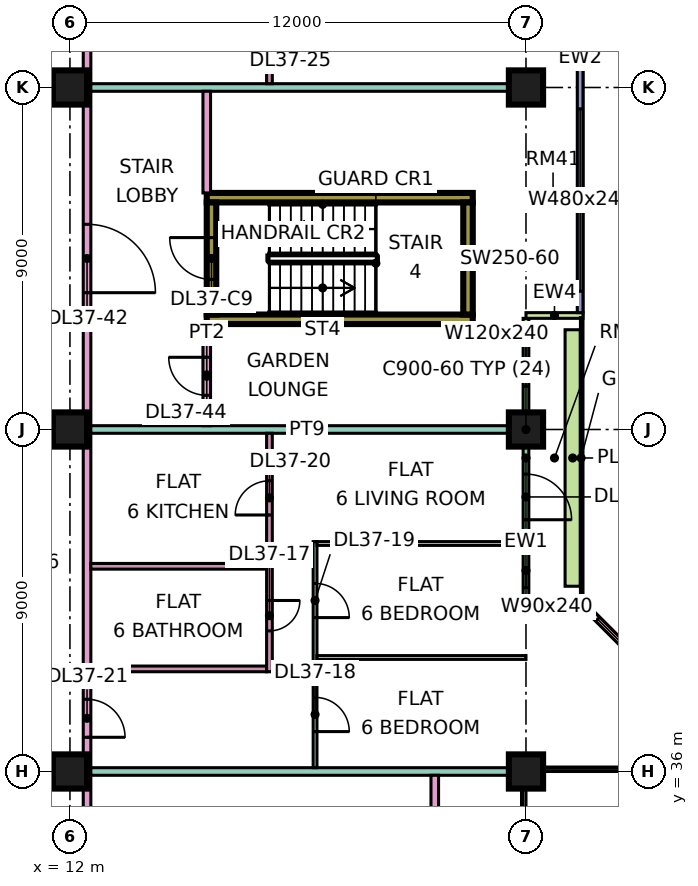
"""IFC4 building model, lengths in metres.
Left out: names, types, materials, properties, quantities, classifications, styles, units other than length and angle.
Written with IfcOpenShell. Run it as: python <this file> out.ifc"""

import sys

from ifc_helpers import new_model, si_unit, direction, frame, frame_2d, origin, origin_2d, place, context, subcontext, project, spatial, rectangle, extrude, element, fill, save


model = new_model("IFC4")
c1 = context("Model", 3, precision=1e-05, world=origin(), true_north=direction((0.0, 1.0)))
c2 = subcontext(c1, "Body", "Model", "MODEL_VIEW")
j1 = project(units=[si_unit("LENGTHUNIT", "METRE"), si_unit("PLANEANGLEUNIT", "RADIAN")], contexts=[c1])
p1 = place(None, origin())
s1 = spatial("IfcSite", under=j1, at=p1, CompositionType="ELEMENT")
p2 = place(p1, origin())
s2 = spatial("IfcBuilding", under=s1, at=p2, CompositionType="ELEMENT")
p3 = place(p2, frame((0.0, 0.0, 164.9)))
s3 = spatial("IfcBuildingStorey", under=s2, at=p3, CompositionType="ELEMENT", Elevation=164.9)
for number, where, z_axis, x_axis in (
    (1, (12.0, 36.0, 0.0), (0.0, 0.0, 1.0), (1.0, 0.0, 0.0)),
    (2, (12.0, 45.0, 0.0), (0.0, 0.0, 1.0), (1.0, 0.0, 0.0)),
    (3, (12.0, 54.0, 0.0), (0.0, 0.0, 1.0), (1.0, 0.0, 0.0)),
    (4, (24.0, 36.0, 0.0), (0.0, 0.0, 1.0), (1.0, 0.0, 0.0)),
    (5, (24.0, 45.0, 0.0), (0.0, 0.0, 1.0), (1.0, 0.0, 0.0)),
    (6, (24.0, 54.0, 0.0), (0.0, 0.0, 1.0), (1.0, 0.0, 0.0)),
):
    element("IfcColumn", number, at=place(p3, frame(where, z_axis=z_axis, x_axis=x_axis)), inside=s3, PredefinedType="COLUMN", context=c2, shape_type="SweptSolid", body=[
        extrude(rectangle(XDim=0.9, YDim=0.9, at=origin_2d()), origin(), (0.0, 0.0, 1.0), 3.75),
    ])
for number, where, z_axis, x_axis in (
    (7, (15.6, 47.9, 0.0), (0.0, 0.0, 1.0), (1.0, 0.0, 0.0)),
    (8, (15.6, 51.1, 0.0), (0.0, 0.0, 1.0), (1.0, 0.0, 0.0)),
):
    element("IfcWall", number, at=place(p3, frame(where, z_axis=z_axis, x_axis=x_axis)), inside=s3, PredefinedType="SHEAR", context=c2, shape_type="SweptSolid", body=[
        extrude(rectangle(XDim=7.0, YDim=0.25, at=frame_2d((3.5, 0.0))), origin(), (0.0, 0.0, 1.0), 3.75),
    ])
p4 = place(p3, frame((15.725, 48.025, 0.0), z_axis=(0.0, 0.0, 1.0), x_axis=(0.0, 1.0, 0.0)))
e9 = element("IfcWall", 9, at=p4, inside=s3, PredefinedType="SHEAR", context=c2, shape_type="SweptSolid", body=[
    extrude(rectangle(XDim=2.95, YDim=0.25, at=frame_2d((1.475, 0.0))), origin(), (0.0, 0.0, 1.0), 3.75),
])
p5 = place(p4, frame((0.925, 0.0, 0.0)))
e10 = element("IfcOpeningElement", 10, at=p5, cuts=e9, PredefinedType="OPENING", context=c2, shape_type="SweptSolid", body=[
    extrude(rectangle(XDim=1.1, YDim=2.2, at=frame_2d((0.55, 1.1))), frame((0.0, 0.135, 0.0), z_axis=(0.0, -1.0, 0.0), x_axis=(1.0, 0.0, 0.0)), (0.0, 0.0, 1.0), 0.27),
])
p6 = place(p3, frame((22.475, 48.025, 0.0), z_axis=(0.0, 0.0, 1.0), x_axis=(0.0, 1.0, 0.0)))
e11 = element("IfcWall", 11, at=p6, inside=s3, PredefinedType="SHEAR", context=c2, shape_type="SweptSolid", body=[
    extrude(rectangle(XDim=2.95, YDim=0.25, at=frame_2d((1.475, 0.0))), origin(), (0.0, 0.0, 1.0), 3.75),
])
p7 = place(p3, frame((28.447, 37.447, 0.0), z_axis=(0.0, 0.0, 1.0), x_axis=(-0.707106781187, 0.707106781187, 0.0)))
e12 = element("IfcWall", 12, at=p7, inside=s3, PredefinedType="SOLIDWALL", context=c2, shape_type="SweptSolid", body=[
    extrude(rectangle(XDim=4.243, YDim=0.15, at=frame_2d((2.121, 0.0))), origin(), (0.0, 0.0, 1.0), 3.35),
])
p8 = place(p7, frame((0.621, 0.0, 0.45)))
e13 = element("IfcOpeningElement", 13, at=p8, cuts=e12, PredefinedType="OPENING", context=c2, shape_type="SweptSolid", body=[
    extrude(rectangle(XDim=3.0, YDim=2.4, at=frame_2d((1.5, 1.2))), frame((0.0, 0.085, 0.0), z_axis=(0.0, -1.0, 0.0), x_axis=(1.0, 0.0, 0.0)), (0.0, 0.0, 1.0), 0.17),
])
p9 = place(p3, frame((24.0, 40.575, 0.0), z_axis=(0.0, 0.0, 1.0), x_axis=(0.0, 1.0, 0.0)))
e14 = element("IfcWall", 14, at=p9, inside=s3, PredefinedType="SOLIDWALL", context=c2, shape_type="SweptSolid", body=[
    extrude(rectangle(XDim=7.35, YDim=0.15, at=frame_2d((3.675, 0.0))), origin(), (0.0, 0.0, 1.0), 3.35),
])
p10 = place(p9, frame((0.262, 0.0, 0.45)))
e15 = element("IfcOpeningElement", 15, at=p10, cuts=e14, PredefinedType="OPENING", context=c2, shape_type="SweptSolid", body=[
    extrude(rectangle(XDim=0.9, YDim=2.4, at=frame_2d((0.45, 1.2))), frame((0.0, 0.085, 0.0), z_axis=(0.0, -1.0, 0.0), x_axis=(1.0, 0.0, 0.0)), (0.0, 0.0, 1.0), 0.17),
])
p11 = place(p9, frame((2.05, 0.0, 0.0)))
e16 = element("IfcOpeningElement", 16, at=p11, cuts=e14, PredefinedType="OPENING", context=c2, shape_type="SweptSolid", body=[
    extrude(rectangle(XDim=1.2, YDim=2.4, at=frame_2d((0.6, 1.2))), frame((0.0, 0.085, 0.0), z_axis=(0.0, -1.0, 0.0), x_axis=(1.0, 0.0, 0.0)), (0.0, 0.0, 1.0), 0.17),
])
p12 = place(p9, frame((5.562, 0.0, 0.45)))
e17 = element("IfcOpeningElement", 17, at=p12, cuts=e14, PredefinedType="OPENING", context=c2, shape_type="SweptSolid", body=[
    extrude(rectangle(XDim=1.2, YDim=2.4, at=frame_2d((0.6, 1.2))), frame((0.0, 0.085, 0.0), z_axis=(0.0, -1.0, 0.0), x_axis=(1.0, 0.0, 0.0)), (0.0, 0.0, 1.0), 0.17),
])
for number, where, z_axis, x_axis in (
    (18, (25.5, 40.5, 0.0), (0.0, 0.0, 1.0), (-1.0, 0.0, 0.0)),
    (19, (25.5, 48.0, 0.0), (0.0, 0.0, 1.0), (-1.0, 0.0, 0.0)),
):
    element("IfcWall", number, at=place(p3, frame(where, z_axis=z_axis, x_axis=x_axis)), inside=s3, PredefinedType="SOLIDWALL", context=c2, shape_type="SweptSolid", body=[
        extrude(rectangle(XDim=1.5, YDim=0.15, at=frame_2d((0.75, 0.0))), origin(), (0.0, 0.0, 1.0), 3.35),
    ])
p13 = place(p3, frame((25.425, 48.075, 0.0), z_axis=(0.0, 0.0, 1.0), x_axis=(0.0, 1.0, 0.0)))
e20 = element("IfcWall", 20, at=p13, inside=s3, PredefinedType="SOLIDWALL", context=c2, shape_type="SweptSolid", body=[
    extrude(rectangle(XDim=13.425, YDim=0.15, at=frame_2d((6.712, 0.0))), origin(), (0.0, 0.0, 1.0), 3.35),
])
p14 = place(p13, frame((0.562, 0.0, 0.45)))
e21 = element("IfcOpeningElement", 21, at=p14, cuts=e20, PredefinedType="OPENING", context=c2, shape_type="SweptSolid", body=[
    extrude(rectangle(XDim=4.8, YDim=2.4, at=frame_2d((2.4, 1.2))), frame((0.0, 0.085, 0.0), z_axis=(0.0, -1.0, 0.0), x_axis=(1.0, 0.0, 0.0)), (0.0, 0.0, 1.0), 0.17),
])
p15 = place(p13, frame((6.525, 0.0, 0.45)))
e22 = element("IfcOpeningElement", 22, at=p15, cuts=e20, PredefinedType="OPENING", context=c2, shape_type="SweptSolid", body=[
    extrude(rectangle(XDim=1.8, YDim=2.4, at=frame_2d((0.9, 1.2))), frame((0.0, 0.085, 0.0), z_axis=(0.0, -1.0, 0.0), x_axis=(1.0, 0.0, 0.0)), (0.0, 0.0, 1.0), 0.17),
])
p16 = place(p13, frame((9.525, 0.0, 0.45)))
e23 = element("IfcOpeningElement", 23, at=p16, cuts=e20, PredefinedType="OPENING", context=c2, shape_type="SweptSolid", body=[
    extrude(rectangle(XDim=1.8, YDim=2.4, at=frame_2d((0.9, 1.2))), frame((0.0, 0.085, 0.0), z_axis=(0.0, -1.0, 0.0), x_axis=(1.0, 0.0, 0.0)), (0.0, 0.0, 1.0), 0.17),
])
p17 = place(p13, frame((12.225, 0.0, 0.45)))
e24 = element("IfcOpeningElement", 24, at=p17, cuts=e20, PredefinedType="OPENING", context=c2, shape_type="SweptSolid", body=[
    extrude(rectangle(XDim=0.9, YDim=2.4, at=frame_2d((0.45, 1.2))), frame((0.0, 0.085, 0.0), z_axis=(0.0, -1.0, 0.0), x_axis=(1.0, 0.0, 0.0)), (0.0, 0.0, 1.0), 0.17),
])
p18 = place(p3, frame((25.229, 40.875, 0.0), z_axis=(0.0, 0.0, 1.0), x_axis=(0.0, 1.0, 0.0)))
e25 = element("IfcWall", 25, at=p18, inside=s3, PredefinedType="SOLIDWALL", context=c2, shape_type="SweptSolid", body=[
    extrude(rectangle(XDim=6.75, YDim=0.4, at=frame_2d((3.375, 0.0))), origin(), (0.0, 0.0, 1.0), 0.7),
])
p19 = place(p3, frame((12.45, 20.0, 0.0), z_axis=(0.0, 0.0, 1.0), x_axis=(0.0, 1.0, 0.0)))
e26 = element("IfcWall", 26, at=p19, inside=s3, PredefinedType="PARTITIONING", context=c2, shape_type="SweptSolid", body=[
    extrude(rectangle(XDim=42.926, YDim=0.2, at=frame_2d((21.463, 0.0))), origin(), (0.0, 0.0, 1.0), 3.35),
])
p20 = place(p19, frame((6.55, 0.0, 0.0)))
e27 = element("IfcOpeningElement", 27, at=p20, cuts=e26, PredefinedType="OPENING", context=c2, shape_type="SweptSolid", body=[
    extrude(rectangle(XDim=1.0, YDim=2.1, at=frame_2d((0.5, 1.05))), frame((0.0, 0.11, 0.0), z_axis=(0.0, -1.0, 0.0), x_axis=(1.0, 0.0, 0.0)), (0.0, 0.0, 1.0), 0.22),
])
p21 = place(p19, frame((12.25, 0.0, 0.0)))
e28 = element("IfcOpeningElement", 28, at=p21, cuts=e26, PredefinedType="OPENING", context=c2, shape_type="SweptSolid", body=[
    extrude(rectangle(XDim=1.6, YDim=2.1, at=frame_2d((0.8, 1.05))), frame((0.0, 0.11, 0.0), z_axis=(0.0, -1.0, 0.0), x_axis=(1.0, 0.0, 0.0)), (0.0, 0.0, 1.0), 0.22),
])
p22 = place(p19, frame((16.9, 0.0, 0.0)))
e29 = element("IfcOpeningElement", 29, at=p22, cuts=e26, PredefinedType="OPENING", context=c2, shape_type="SweptSolid", body=[
    extrude(rectangle(XDim=1.0, YDim=2.1, at=frame_2d((0.5, 1.05))), frame((0.0, 0.11, 0.0), z_axis=(0.0, -1.0, 0.0), x_axis=(1.0, 0.0, 0.0)), (0.0, 0.0, 1.0), 0.22),
])
p23 = place(p19, frame((40.9, 0.0, 0.0)))
e30 = element("IfcOpeningElement", 30, at=p23, cuts=e26, PredefinedType="OPENING", context=c2, shape_type="SweptSolid", body=[
    extrude(rectangle(XDim=1.0, YDim=2.1, at=frame_2d((0.5, 1.05))), frame((0.0, 0.11, 0.0), z_axis=(0.0, -1.0, 0.0), x_axis=(1.0, 0.0, 0.0)), (0.0, 0.0, 1.0), 0.22),
])
p24 = place(p19, frame((1.15, 0.0, 0.0)))
e31 = element("IfcOpeningElement", 31, at=p24, cuts=e26, PredefinedType="OPENING", context=c2, shape_type="SweptSolid", body=[
    extrude(rectangle(XDim=1.8, YDim=2.1, at=frame_2d((0.9, 1.05))), frame((0.0, 0.11, 0.0), z_axis=(0.0, -1.0, 0.0), x_axis=(1.0, 0.0, 0.0)), (0.0, 0.0, 1.0), 0.22),
])
p25 = place(p19, frame((28.6, 0.0, 0.0)))
e32 = element("IfcOpeningElement", 32, at=p25, cuts=e26, PredefinedType="OPENING", context=c2, shape_type="SweptSolid", body=[
    extrude(rectangle(XDim=1.8, YDim=2.1, at=frame_2d((0.9, 1.05))), frame((0.0, 0.11, 0.0), z_axis=(0.0, -1.0, 0.0), x_axis=(1.0, 0.0, 0.0)), (0.0, 0.0, 1.0), 0.22),
])
p26 = place(p3, frame((12.55, 36.0, 0.0), z_axis=(0.0, 0.0, 1.0), x_axis=(1.0, 0.0, 0.0)))
e33 = element("IfcWall", 33, at=p26, inside=s3, PredefinedType="PARTITIONING", context=c2, shape_type="SweptSolid", body=[
    extrude(rectangle(XDim=11.45, YDim=0.2, at=frame_2d((5.725, 0.0))), origin(), (0.0, 0.0, 1.0), 3.35),
])
for number, where, z_axis, x_axis in (
    (34, (12.55, 38.7, 0.0), (0.0, 0.0, 1.0), (1.0, 0.0, 0.0)),
    (35, (12.55, 41.4, 0.0), (0.0, 0.0, 1.0), (1.0, 0.0, 0.0)),
):
    element("IfcWall", number, at=place(p3, frame(where, z_axis=z_axis, x_axis=x_axis)), inside=s3, PredefinedType="PARTITIONING", context=c2, shape_type="SweptSolid", body=[
        extrude(rectangle(XDim=4.625, YDim=0.15, at=frame_2d((2.312, 0.0))), origin(), (0.0, 0.0, 1.0), 3.35),
    ])
p27 = place(p3, frame((12.55, 45.0, 0.0), z_axis=(0.0, 0.0, 1.0), x_axis=(1.0, 0.0, 0.0)))
e36 = element("IfcWall", 36, at=p27, inside=s3, PredefinedType="PARTITIONING", context=c2, shape_type="SweptSolid", body=[
    extrude(rectangle(XDim=11.376, YDim=0.2, at=frame_2d((5.688, 0.0))), origin(), (0.0, 0.0, 1.0), 3.35),
])
p28 = place(p3, frame((12.55, 54.0, 0.0), z_axis=(0.0, 0.0, 1.0), x_axis=(1.0, 0.0, 0.0)))
e37 = element("IfcWall", 37, at=p28, inside=s3, PredefinedType="PARTITIONING", context=c2, shape_type="SweptSolid", body=[
    extrude(rectangle(XDim=11.45, YDim=0.2, at=frame_2d((5.725, 0.0))), origin(), (0.0, 0.0, 1.0), 3.35),
])
p29 = place(p3, frame((15.6, 45.1, 0.0), z_axis=(0.0, 0.0, 1.0), x_axis=(0.0, 1.0, 0.0)))
e38 = element("IfcWall", 38, at=p29, inside=s3, PredefinedType="PARTITIONING", context=c2, shape_type="SweptSolid", body=[
    extrude(rectangle(XDim=2.675, YDim=0.2, at=frame_2d((1.337, 0.0))), origin(), (0.0, 0.0, 1.0), 3.35),
])
p30 = place(p29, frame((0.8, 0.0, 0.0)))
e39 = element("IfcOpeningElement", 39, at=p30, cuts=e38, PredefinedType="OPENING", context=c2, shape_type="SweptSolid", body=[
    extrude(rectangle(XDim=1.0, YDim=2.1, at=frame_2d((0.5, 1.05))), frame((0.0, 0.11, 0.0), z_axis=(0.0, -1.0, 0.0), x_axis=(1.0, 0.0, 0.0)), (0.0, 0.0, 1.0), 0.22),
])
p31 = place(p3, frame((15.6, 51.225, 0.0), z_axis=(0.0, 0.0, 1.0), x_axis=(0.0, 1.0, 0.0)))
e40 = element("IfcWall", 40, at=p31, inside=s3, PredefinedType="PARTITIONING", context=c2, shape_type="SweptSolid", body=[
    extrude(rectangle(XDim=2.675, YDim=0.2, at=frame_2d((1.337, 0.0))), origin(), (0.0, 0.0, 1.0), 3.35),
])
p32 = place(p3, frame((17.25, 38.625, 0.0), z_axis=(0.0, 0.0, 1.0), x_axis=(0.0, 1.0, 0.0)))
e41 = element("IfcWall", 41, at=p32, inside=s3, PredefinedType="PARTITIONING", context=c2, shape_type="SweptSolid", body=[
    extrude(rectangle(XDim=6.275, YDim=0.15, at=frame_2d((3.137, 0.0))), origin(), (0.0, 0.0, 1.0), 3.35),
])
p33 = place(p32, frame((1.075, 0.0, 0.0)))
e42 = element("IfcOpeningElement", 42, at=p33, cuts=e41, PredefinedType="OPENING", context=c2, shape_type="SweptSolid", body=[
    extrude(rectangle(XDim=0.8, YDim=2.1, at=frame_2d((0.4, 1.05))), frame((0.0, 0.085, 0.0), z_axis=(0.0, -1.0, 0.0), x_axis=(1.0, 0.0, 0.0)), (0.0, 0.0, 1.0), 0.17),
])
p34 = place(p32, frame((4.125, 0.0, 0.0)))
e43 = element("IfcOpeningElement", 43, at=p34, cuts=e41, PredefinedType="OPENING", context=c2, shape_type="SweptSolid", body=[
    extrude(rectangle(XDim=0.9, YDim=2.1, at=frame_2d((0.45, 1.05))), frame((0.0, 0.085, 0.0), z_axis=(0.0, -1.0, 0.0), x_axis=(1.0, 0.0, 0.0)), (0.0, 0.0, 1.0), 0.17),
])
p35 = place(p3, frame((17.25, 54.1, 0.0), z_axis=(0.0, 0.0, 1.0), x_axis=(0.0, 1.0, 0.0)))
e44 = element("IfcWall", 44, at=p35, inside=s3, PredefinedType="PARTITIONING", context=c2, shape_type="SweptSolid", body=[
    extrude(rectangle(XDim=5.675, YDim=0.15, at=frame_2d((2.837, 0.0))), origin(), (0.0, 0.0, 1.0), 3.35),
])
p36 = place(p35, frame((1.1, 0.0, 0.0)))
e45 = element("IfcOpeningElement", 45, at=p36, cuts=e44, PredefinedType="OPENING", context=c2, shape_type="SweptSolid", body=[
    extrude(rectangle(XDim=0.9, YDim=2.1, at=frame_2d((0.45, 1.05))), frame((0.0, 0.085, 0.0), z_axis=(0.0, -1.0, 0.0), x_axis=(1.0, 0.0, 0.0)), (0.0, 0.0, 1.0), 0.17),
])
p37 = place(p3, frame((18.45, 36.1, 0.0), z_axis=(0.0, 0.0, 1.0), x_axis=(0.0, 1.0, 0.0)))
e46 = element("IfcWall", 46, at=p37, inside=s3, PredefinedType="PARTITIONING", context=c2, shape_type="SweptSolid", body=[
    extrude(rectangle(XDim=5.95, YDim=0.1, at=frame_2d((2.975, 0.0))), origin(), (0.0, 0.0, 1.0), 3.35),
])
p38 = place(p37, frame((0.95, 0.0, 0.0)))
e47 = element("IfcOpeningElement", 47, at=p38, cuts=e46, PredefinedType="OPENING", context=c2, shape_type="SweptSolid", body=[
    extrude(rectangle(XDim=0.9, YDim=2.1, at=frame_2d((0.45, 1.05))), frame((0.0, 0.06, 0.0), z_axis=(0.0, -1.0, 0.0), x_axis=(1.0, 0.0, 0.0)), (0.0, 0.0, 1.0), 0.12),
])
p39 = place(p37, frame((3.95, 0.0, 0.0)))
e48 = element("IfcOpeningElement", 48, at=p39, cuts=e46, PredefinedType="OPENING", context=c2, shape_type="SweptSolid", body=[
    extrude(rectangle(XDim=0.9, YDim=2.1, at=frame_2d((0.45, 1.05))), frame((0.0, 0.06, 0.0), z_axis=(0.0, -1.0, 0.0), x_axis=(1.0, 0.0, 0.0)), (0.0, 0.0, 1.0), 0.12),
])
p40 = place(p3, frame((18.5, 39.0, 0.0), z_axis=(0.0, 0.0, 1.0), x_axis=(1.0, 0.0, 0.0)))
e49 = element("IfcWall", 49, at=p40, inside=s3, PredefinedType="PARTITIONING", context=c2, shape_type="SweptSolid", body=[
    extrude(rectangle(XDim=5.5, YDim=0.1, at=frame_2d((2.75, 0.0))), origin(), (0.0, 0.0, 1.0), 3.35),
])
p41 = place(p3, frame((18.5, 42.0, 0.0), z_axis=(0.0, 0.0, 1.0), x_axis=(1.0, 0.0, 0.0)))
e50 = element("IfcWall", 50, at=p41, inside=s3, PredefinedType="PARTITIONING", context=c2, shape_type="SweptSolid", body=[
    extrude(rectangle(XDim=5.426, YDim=0.1, at=frame_2d((2.713, 0.0))), origin(), (0.0, 0.0, 1.0), 3.35),
])
p42 = place(p3, frame((21.6, 23.9, 0.0), z_axis=(0.0, 0.0, 1.0), x_axis=(0.0, 1.0, 0.0)))
e51 = element("IfcWall", 51, at=p42, inside=s3, PredefinedType="PARTITIONING", context=c2, shape_type="SweptSolid", body=[
    extrude(rectangle(XDim=12.0, YDim=0.2, at=frame_2d((6.0, 0.0))), origin(), (0.0, 0.0, 1.0), 3.35),
])
p43 = place(p8, origin())
e52 = element("IfcWindow", 52, at=p43, inside=s3, PartitioningType="SINGLE_PANEL", PredefinedType="WINDOW", context=c2, shape_type="SweptSolid", body=[
    extrude(rectangle(XDim=3.0, YDim=2.4, at=frame_2d((1.5, 1.2))), frame((0.0, 0.03, 0.0), z_axis=(0.0, -1.0, 0.0), x_axis=(1.0, 0.0, 0.0)), (0.0, 0.0, 1.0), 0.06),
])
fill(e13, e52)
p44 = place(p10, origin())
e53 = element("IfcWindow", 53, at=p44, inside=s3, PartitioningType="SINGLE_PANEL", PredefinedType="WINDOW", context=c2, shape_type="SweptSolid", body=[
    extrude(rectangle(XDim=0.9, YDim=2.4, at=frame_2d((0.45, 1.2))), frame((0.0, 0.03, 0.0), z_axis=(0.0, -1.0, 0.0), x_axis=(1.0, 0.0, 0.0)), (0.0, 0.0, 1.0), 0.06),
])
fill(e15, e53)
p45 = place(p11, frame((1.2, 0.0, 0.0), z_axis=(0.0, 0.0, 1.0), x_axis=(-1.0, 0.0, 0.0)))
e54 = element("IfcDoor", 54, at=p45, inside=s3, OperationType="DOUBLE_DOOR_SINGLE_SWING", PredefinedType="DOOR", context=c2, shape_type="SweptSolid", body=[
    extrude(rectangle(XDim=1.2, YDim=2.4, at=frame_2d((0.6, 1.2))), frame((0.0, 0.025, 0.0), z_axis=(0.0, -1.0, 0.0), x_axis=(1.0, 0.0, 0.0)), (0.0, 0.0, 1.0), 0.05),
])
fill(e16, e54)
p46 = place(p12, origin())
e55 = element("IfcWindow", 55, at=p46, inside=s3, PartitioningType="SINGLE_PANEL", PredefinedType="WINDOW", context=c2, shape_type="SweptSolid", body=[
    extrude(rectangle(XDim=1.2, YDim=2.4, at=frame_2d((0.6, 1.2))), frame((0.0, 0.03, 0.0), z_axis=(0.0, -1.0, 0.0), x_axis=(1.0, 0.0, 0.0)), (0.0, 0.0, 1.0), 0.06),
])
fill(e17, e55)
p47 = place(p14, origin())
e56 = element("IfcWindow", 56, at=p47, inside=s3, PartitioningType="SINGLE_PANEL", PredefinedType="WINDOW", context=c2, shape_type="SweptSolid", body=[
    extrude(rectangle(XDim=4.8, YDim=2.4, at=frame_2d((2.4, 1.2))), frame((0.0, 0.03, 0.0), z_axis=(0.0, -1.0, 0.0), x_axis=(1.0, 0.0, 0.0)), (0.0, 0.0, 1.0), 0.06),
])
fill(e21, e56)
p48 = place(p15, origin())
e57 = element("IfcWindow", 57, at=p48, inside=s3, PartitioningType="SINGLE_PANEL", PredefinedType="WINDOW", context=c2, shape_type="SweptSolid", body=[
    extrude(rectangle(XDim=1.8, YDim=2.4, at=frame_2d((0.9, 1.2))), frame((0.0, 0.03, 0.0), z_axis=(0.0, -1.0, 0.0), x_axis=(1.0, 0.0, 0.0)), (0.0, 0.0, 1.0), 0.06),
])
fill(e22, e57)
p49 = place(p5, frame((1.1, 0.0, 0.0), z_axis=(0.0, 0.0, 1.0), x_axis=(-1.0, 0.0, 0.0)))
e58 = element("IfcDoor", 58, at=p49, inside=s3, OperationType="SINGLE_SWING_RIGHT", PredefinedType="DOOR", context=c2, shape_type="SweptSolid", body=[
    extrude(rectangle(XDim=1.1, YDim=2.2, at=frame_2d((0.55, 1.1))), frame((0.0, 0.025, 0.0), z_axis=(0.0, -1.0, 0.0), x_axis=(1.0, 0.0, 0.0)), (0.0, 0.0, 1.0), 0.05),
])
fill(e10, e58)
p50 = place(p33, origin())
e59 = element("IfcDoor", 59, at=p50, inside=s3, OperationType="SINGLE_SWING_RIGHT", PredefinedType="DOOR", context=c2, shape_type="SweptSolid", body=[
    extrude(rectangle(XDim=0.8, YDim=2.1, at=frame_2d((0.4, 1.05))), frame((0.0, 0.025, 0.0), z_axis=(0.0, -1.0, 0.0), x_axis=(1.0, 0.0, 0.0)), (0.0, 0.0, 1.0), 0.05),
])
fill(e42, e59)
p51 = place(p38, frame((0.9, 0.0, 0.0), z_axis=(0.0, 0.0, 1.0), x_axis=(-1.0, 0.0, 0.0)))
e60 = element("IfcDoor", 60, at=p51, inside=s3, OperationType="SINGLE_SWING_LEFT", PredefinedType="DOOR", context=c2, shape_type="SweptSolid", body=[
    extrude(rectangle(XDim=0.9, YDim=2.1, at=frame_2d((0.45, 1.05))), frame((0.0, 0.025, 0.0), z_axis=(0.0, -1.0, 0.0), x_axis=(1.0, 0.0, 0.0)), (0.0, 0.0, 1.0), 0.05),
])
fill(e47, e60)
p52 = place(p39, frame((0.9, 0.0, 0.0), z_axis=(0.0, 0.0, 1.0), x_axis=(-1.0, 0.0, 0.0)))
e61 = element("IfcDoor", 61, at=p52, inside=s3, OperationType="SINGLE_SWING_LEFT", PredefinedType="DOOR", context=c2, shape_type="SweptSolid", body=[
    extrude(rectangle(XDim=0.9, YDim=2.1, at=frame_2d((0.45, 1.05))), frame((0.0, 0.025, 0.0), z_axis=(0.0, -1.0, 0.0), x_axis=(1.0, 0.0, 0.0)), (0.0, 0.0, 1.0), 0.05),
])
fill(e48, e61)
p53 = place(p34, origin())
e62 = element("IfcDoor", 62, at=p53, inside=s3, OperationType="SINGLE_SWING_LEFT", PredefinedType="DOOR", context=c2, shape_type="SweptSolid", body=[
    extrude(rectangle(XDim=0.9, YDim=2.1, at=frame_2d((0.45, 1.05))), frame((0.0, 0.025, 0.0), z_axis=(0.0, -1.0, 0.0), x_axis=(1.0, 0.0, 0.0)), (0.0, 0.0, 1.0), 0.05),
])
fill(e43, e62)
p54 = place(p22, frame((1.0, 0.0, 0.0), z_axis=(0.0, 0.0, 1.0), x_axis=(-1.0, 0.0, 0.0)))
e63 = element("IfcDoor", 63, at=p54, inside=s3, OperationType="SINGLE_SWING_LEFT", PredefinedType="DOOR", context=c2, shape_type="SweptSolid", body=[
    extrude(rectangle(XDim=1.0, YDim=2.1, at=frame_2d((0.5, 1.05))), frame((0.0, 0.025, 0.0), z_axis=(0.0, -1.0, 0.0), x_axis=(1.0, 0.0, 0.0)), (0.0, 0.0, 1.0), 0.05),
])
fill(e29, e63)
p55 = place(p25, frame((1.8, 0.0, 0.0), z_axis=(0.0, 0.0, 1.0), x_axis=(-1.0, 0.0, 0.0)))
e64 = element("IfcDoor", 64, at=p55, inside=s3, OperationType="DOUBLE_DOOR_SINGLE_SWING", PredefinedType="DOOR", context=c2, shape_type="SweptSolid", body=[
    extrude(rectangle(XDim=1.8, YDim=2.1, at=frame_2d((0.9, 1.05))), frame((0.0, 0.025, 0.0), z_axis=(0.0, -1.0, 0.0), x_axis=(1.0, 0.0, 0.0)), (0.0, 0.0, 1.0), 0.05),
])
fill(e32, e64)
p56 = place(p30, frame((1.0, 0.0, 0.0), z_axis=(0.0, 0.0, 1.0), x_axis=(-1.0, 0.0, 0.0)))
e65 = element("IfcDoor", 65, at=p56, inside=s3, OperationType="SINGLE_SWING_RIGHT", PredefinedType="DOOR", context=c2, shape_type="SweptSolid", body=[
    extrude(rectangle(XDim=1.0, YDim=2.1, at=frame_2d((0.5, 1.05))), frame((0.0, 0.025, 0.0), z_axis=(0.0, -1.0, 0.0), x_axis=(1.0, 0.0, 0.0)), (0.0, 0.0, 1.0), 0.05),
])
fill(e39, e65)
save(model, sys.argv[1])
